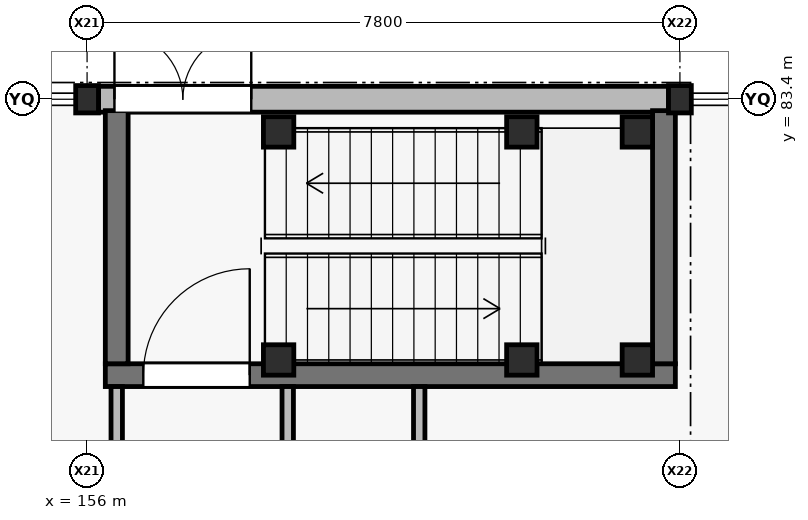
"""IFC4 building model, lengths in metres.
Left out: names, types, materials, properties, quantities, classifications, styles, units other than length and angle.
Written with IfcOpenShell. Run it as: python <this file> out.ifc"""

import sys

from ifc_helpers import new_model, si_unit, direction, frame, frame_2d, origin, origin_2d, place, context, subcontext, project, spatial, rectangle, i_section, extrude, element, fill, save


model = new_model("IFC4")
c1 = context("Model", 3, precision=1e-05, world=origin(), true_north=direction((0.0, 1.0)))
c2 = subcontext(c1, "Body", "Model", "MODEL_VIEW")
j1 = project(units=[si_unit("LENGTHUNIT", "METRE"), si_unit("PLANEANGLEUNIT", "RADIAN")], contexts=[c1])
p1 = place(None, origin())
s1 = spatial("IfcSite", under=j1, at=p1, CompositionType="ELEMENT")
p2 = place(p1, origin())
s2 = spatial("IfcBuilding", under=s1, at=p2, CompositionType="ELEMENT")
p3 = place(p2, origin())
s3 = spatial("IfcBuildingStorey", under=s2, at=p3, CompositionType="ELEMENT", Elevation=0.0)
for number, where, z_axis, x_axis in (
    (1, (156.0, 83.4, 0.0), (0.0, 0.0, 1.0), (1.0, 0.0, 0.0)),
    (2, (163.8, 83.4, 0.0), (0.0, 0.0, 1.0), (1.0, 0.0, 0.0)),
):
    element("IfcColumn", number, at=place(p3, frame(where, z_axis=z_axis, x_axis=x_axis)), inside=s3, PredefinedType="COLUMN", context=c2, shape_type="SweptSolid", body=[
        extrude(i_section(OverallWidth=0.3, OverallDepth=0.36, WebThickness=0.012, FlangeThickness=0.022, at=origin_2d()), origin(), (0.0, 0.0, 1.0), 4.8),
    ])
for number, where, z_axis, x_axis in (
    (3, (158.52, 79.97, 0.0), (0.0, 0.0, 1.0), (1.0, 0.0, 0.0)),
    (4, (158.52, 82.97, 0.0), (0.0, 0.0, 1.0), (1.0, 0.0, 0.0)),
    (5, (161.72, 79.97, 0.0), (0.0, 0.0, 1.0), (1.0, 0.0, 0.0)),
    (6, (161.72, 82.97, 0.0), (0.0, 0.0, 1.0), (1.0, 0.0, 0.0)),
    (7, (163.24, 79.97, 0.0), (0.0, 0.0, 1.0), (1.0, 0.0, 0.0)),
    (8, (163.24, 82.97, 0.0), (0.0, 0.0, 1.0), (1.0, 0.0, 0.0)),
):
    element("IfcColumn", number, at=place(p3, frame(where, z_axis=z_axis, x_axis=x_axis)), inside=s3, PredefinedType="COLUMN", context=c2, shape_type="SweptSolid", body=[
        extrude(rectangle(XDim=0.4, YDim=0.4, at=origin_2d()), origin(), (0.0, 0.0, 1.0), 4.8),
    ])
p4 = place(p3, frame((156.15, 83.4, 0.0), z_axis=(0.0, 0.0, 1.0), x_axis=(1.0, 0.0, 0.0)))
e9 = element("IfcWall", 9, at=p4, inside=s3, PredefinedType="STANDARD", context=c2, shape_type="SweptSolid", body=[
    extrude(rectangle(XDim=7.5, YDim=0.34, at=frame_2d((3.75, 0.0))), origin(), (0.0, 0.0, 1.0), 4.14),
])
p5 = place(p4, frame((0.21, 0.0, 0.0)))
e10 = element("IfcOpeningElement", 10, at=p5, cuts=e9, PredefinedType="OPENING", context=c2, shape_type="SweptSolid", body=[
    extrude(rectangle(XDim=1.8, YDim=2.25, at=frame_2d((0.9, 1.125))), frame((0.0, 0.18, 0.0), z_axis=(0.0, -1.0, 0.0), x_axis=(1.0, 0.0, 0.0)), (0.0, 0.0, 1.0), 0.36),
])
p6 = place(p3, frame((156.24, 79.77, 0.0), z_axis=(0.0, 0.0, 1.0), x_axis=(1.0, 0.0, 0.0)))
e11 = element("IfcWall", 11, at=p6, inside=s3, PredefinedType="SHEAR", context=c2, shape_type="SweptSolid", body=[
    extrude(rectangle(XDim=7.5, YDim=0.3, at=frame_2d((3.75, 0.0))), origin(), (0.0, 0.0, 1.0), 4.54),
])
p7 = place(p6, frame((0.5, 0.0, 0.0)))
e12 = element("IfcOpeningElement", 12, at=p7, cuts=e11, PredefinedType="OPENING", context=c2, shape_type="SweptSolid", body=[
    extrude(rectangle(XDim=1.4, YDim=2.2, at=frame_2d((0.7, 1.1))), frame((0.0, 0.16, 0.0), z_axis=(0.0, -1.0, 0.0), x_axis=(1.0, 0.0, 0.0)), (0.0, 0.0, 1.0), 0.32),
])
for number, where, z_axis, x_axis in (
    (13, (156.39, 83.25, 0.0), (0.0, 0.0, 1.0), (0.0, -1.0, 0.0)),
    (14, (163.59, 79.92, 0.0), (0.0, 0.0, 1.0), (0.0, 1.0, 0.0)),
):
    element("IfcWall", number, at=place(p3, frame(where, z_axis=z_axis, x_axis=x_axis)), inside=s3, PredefinedType="SHEAR", context=c2, shape_type="SweptSolid", body=[
        extrude(rectangle(XDim=3.33, YDim=0.3, at=frame_2d((1.665, 0.0))), origin(), (0.0, 0.0, 1.0), 4.54),
    ])
p8 = place(p3, frame((156.39, 75.0, 0.0), z_axis=(0.0, 0.0, 1.0), x_axis=(0.0, 1.0, 0.0)))
e15 = element("IfcWall", 15, at=p8, inside=s3, PredefinedType="PARTITIONING", context=c2, shape_type="SweptSolid", body=[
    extrude(rectangle(XDim=4.62, YDim=0.15, at=frame_2d((2.31, 0.0))), origin(), (0.0, 0.0, 1.0), 4.09),
])
p9 = place(p3, frame((158.64, 75.0, 0.0), z_axis=(0.0, 0.0, 1.0), x_axis=(0.0, 1.0, 0.0)))
e16 = element("IfcWall", 16, at=p9, inside=s3, PredefinedType="PARTITIONING", context=c2, shape_type="SweptSolid", body=[
    extrude(rectangle(XDim=4.62, YDim=0.15, at=frame_2d((2.31, 0.0))), origin(), (0.0, 0.0, 1.0), 4.21),
])
p10 = place(p3, frame((160.37, 75.075, 0.0), z_axis=(0.0, 0.0, 1.0), x_axis=(0.0, 1.0, 0.0)))
e17 = element("IfcWall", 17, at=p10, inside=s3, PredefinedType="PARTITIONING", context=c2, shape_type="SweptSolid", body=[
    extrude(rectangle(XDim=4.545, YDim=0.15, at=frame_2d((2.272, 0.0))), origin(), (0.0, 0.0, 1.0), 4.54),
])
p11 = place(p5, origin())
e18 = element("IfcDoor", 18, at=p11, inside=s3, OperationType="DOUBLE_DOOR_SINGLE_SWING", PredefinedType="DOOR", context=c2, shape_type="SweptSolid", body=[
    extrude(rectangle(XDim=1.8, YDim=2.25, at=frame_2d((0.9, 1.125))), frame((0.0, 0.025, 0.0), z_axis=(0.0, -1.0, 0.0), x_axis=(1.0, 0.0, 0.0)), (0.0, 0.0, 1.0), 0.05),
])
fill(e10, e18)
p12 = place(p7, origin())
e19 = element("IfcDoor", 19, at=p12, inside=s3, OperationType="SINGLE_SWING_RIGHT", PredefinedType="DOOR", context=c2, shape_type="SweptSolid", body=[
    extrude(rectangle(XDim=1.4, YDim=2.2, at=frame_2d((0.7, 1.1))), frame((0.0, 0.025, 0.0), z_axis=(0.0, -1.0, 0.0), x_axis=(1.0, 0.0, 0.0)), (0.0, 0.0, 1.0), 0.05),
])
fill(e12, e19)
save(model, sys.argv[1])
